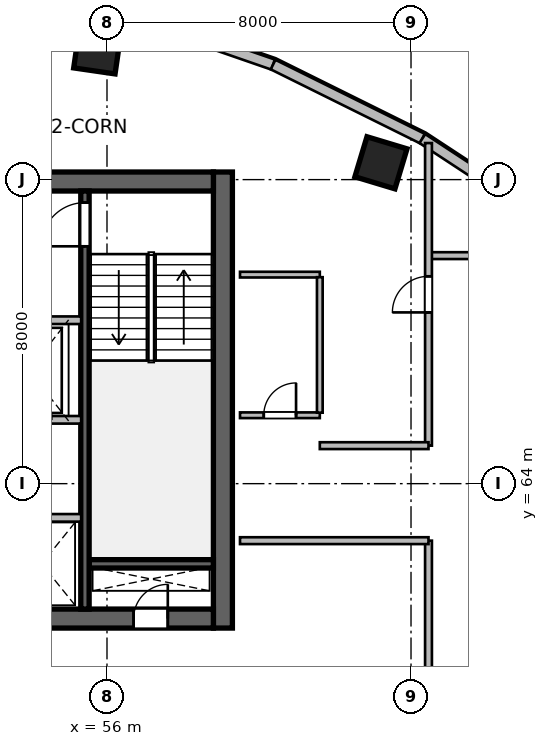
"""IFC4 building model, lengths in metres.
Left out: names, types, materials, properties, quantities, classifications, styles, units other than length and angle.
Written with IfcOpenShell. Run it as: python <this file> out.ifc"""

import sys

from ifc_helpers import new_model, si_unit, direction, frame, frame_2d, origin, origin_2d, place, context, subcontext, project, spatial, rectangle, extrude, source, transform, mapped, element, fill, save


model = new_model("IFC4")
c1 = context("Model", 3, precision=1e-05, world=origin(), true_north=direction((0.0, 1.0)))
c2 = subcontext(c1, "Body", "Model", "MODEL_VIEW")
j1 = project(units=[si_unit("LENGTHUNIT", "METRE"), si_unit("PLANEANGLEUNIT", "RADIAN")], contexts=[c1])
p1 = place(None, origin())
s1 = spatial("IfcSite", under=j1, at=p1, CompositionType="ELEMENT")
p2 = place(p1, origin())
s2 = spatial("IfcBuilding", under=s1, at=p2, CompositionType="ELEMENT")
p3 = place(p2, frame((0.0, 0.0, 174.0)))
s3 = spatial("IfcBuildingStorey", under=s2, at=p3, CompositionType="ELEMENT", Elevation=174.0)
m1 = source(origin(), c2, "Body", "SweptSolid", [
    extrude(rectangle(XDim=12.0, YDim=0.5, at=frame_2d((6.0, 0.0))), origin(), (0.0, 0.0, 1.0), 3.9),
])
p4 = place(p3, frame((59.05, 60.2, 0.0), z_axis=(0.0, 0.0, 1.0), x_axis=(0.0, 1.0, 0.0)))
e1 = element("IfcWall", 1, at=p4, inside=s3, PredefinedType="SHEAR", context=c2, shape_type="MappedRepresentation", body=[
    mapped(m1, transform((0.0, 0.0, 0.0), scale=1.0)),
])
m2 = source(origin(), c2, "Body", "SweptSolid", [
    extrude(rectangle(XDim=21.6, YDim=0.5, at=frame_2d((10.8, 0.0))), origin(), (0.0, 0.0, 1.0), 3.9),
])
p5 = place(p3, frame((37.2, 60.45, 0.0), z_axis=(0.0, 0.0, 1.0), x_axis=(1.0, 0.0, 0.0)))
e2 = element("IfcWall", 2, at=p5, inside=s3, PredefinedType="SHEAR", context=c2, shape_type="MappedRepresentation", body=[
    mapped(m2, transform((0.0, 0.0, 0.0), scale=1.0)),
])
p6 = place(p5, frame((1.1, 0.0, 0.0)))
e3 = element("IfcOpeningElement", 3, at=p6, cuts=e2, PredefinedType="OPENING", context=c2, shape_type="SweptSolid", body=[
    extrude(rectangle(XDim=1.15, YDim=2.15, at=frame_2d((0.575, 1.075))), frame((0.0, 0.26, 0.0), z_axis=(0.0, -1.0, 0.0), x_axis=(1.0, 0.0, 0.0)), (0.0, 0.0, 1.0), 0.52),
])
p7 = place(p5, frame((19.5, 0.0, 0.0)))
e4 = element("IfcOpeningElement", 4, at=p7, cuts=e2, PredefinedType="OPENING", context=c2, shape_type="SweptSolid", body=[
    extrude(rectangle(XDim=0.9, YDim=2.1, at=frame_2d((0.45, 1.05))), frame((0.0, 0.26, 0.0), z_axis=(0.0, -1.0, 0.0), x_axis=(1.0, 0.0, 0.0)), (0.0, 0.0, 1.0), 0.52),
])
p8 = place(p5, frame((12.02, 0.0, 0.0)))
e5 = element("IfcOpeningElement", 5, at=p8, cuts=e2, PredefinedType="OPENING", context=c2, shape_type="SweptSolid", body=[
    extrude(rectangle(XDim=1.6, YDim=2.15, at=frame_2d((0.8, 1.075))), frame((0.0, 0.26, 0.0), z_axis=(0.0, -1.0, 0.0), x_axis=(1.0, 0.0, 0.0)), (0.0, 0.0, 1.0), 0.52),
])
p9 = place(p3, frame((37.2, 71.95, 0.0), z_axis=(0.0, 0.0, 1.0), x_axis=(1.0, 0.0, 0.0)))
e6 = element("IfcWall", 6, at=p9, inside=s3, PredefinedType="SHEAR", context=c2, shape_type="MappedRepresentation", body=[
    mapped(m2, transform((0.0, 0.0, 0.0), scale=1.0)),
])
p10 = place(p9, frame((1.2, 0.0, 0.0)))
e7 = element("IfcOpeningElement", 7, at=p10, cuts=e6, PredefinedType="OPENING", context=c2, shape_type="SweptSolid", body=[
    extrude(rectangle(XDim=0.9, YDim=2.1, at=frame_2d((0.45, 1.05))), frame((0.0, 0.26, 0.0), z_axis=(0.0, -1.0, 0.0), x_axis=(1.0, 0.0, 0.0)), (0.0, 0.0, 1.0), 0.52),
])
p11 = place(p9, frame((14.7, 0.0, 0.0)))
e8 = element("IfcOpeningElement", 8, at=p11, cuts=e6, PredefinedType="OPENING", context=c2, shape_type="SweptSolid", body=[
    extrude(rectangle(XDim=1.2, YDim=2.15, at=frame_2d((0.6, 1.075))), frame((0.0, 0.26, 0.0), z_axis=(0.0, -1.0, 0.0), x_axis=(1.0, 0.0, 0.0)), (0.0, 0.0, 1.0), 0.52),
])
p12 = place(p9, frame((4.15, 0.0, 0.0)))
e9 = element("IfcOpeningElement", 9, at=p12, cuts=e6, PredefinedType="OPENING", context=c2, shape_type="SweptSolid", body=[
    extrude(rectangle(XDim=1.3, YDim=2.15, at=frame_2d((0.65, 1.075))), frame((0.0, 0.26, 0.0), z_axis=(0.0, -1.0, 0.0), x_axis=(1.0, 0.0, 0.0)), (0.0, 0.0, 1.0), 0.52),
])
p13 = place(p9, frame((6.76, 0.0, 0.0)))
e10 = element("IfcOpeningElement", 10, at=p13, cuts=e6, PredefinedType="OPENING", context=c2, shape_type="SweptSolid", body=[
    extrude(rectangle(XDim=0.85, YDim=2.1, at=frame_2d((0.425, 1.05))), frame((0.0, 0.26, 0.0), z_axis=(0.0, -1.0, 0.0), x_axis=(1.0, 0.0, 0.0)), (0.0, 0.0, 1.0), 0.52),
])
p14 = place(p9, frame((8.76, 0.0, 0.0)))
e11 = element("IfcOpeningElement", 11, at=p14, cuts=e6, PredefinedType="OPENING", context=c2, shape_type="SweptSolid", body=[
    extrude(rectangle(XDim=0.85, YDim=2.1, at=frame_2d((0.425, 1.05))), frame((0.0, 0.26, 0.0), z_axis=(0.0, -1.0, 0.0), x_axis=(1.0, 0.0, 0.0)), (0.0, 0.0, 1.0), 0.52),
])
p15 = place(p9, frame((10.725, 0.0, 0.0)))
e12 = element("IfcOpeningElement", 12, at=p15, cuts=e6, PredefinedType="OPENING", context=c2, shape_type="SweptSolid", body=[
    extrude(rectangle(XDim=0.85, YDim=2.1, at=frame_2d((0.425, 1.05))), frame((0.0, 0.26, 0.0), z_axis=(0.0, -1.0, 0.0), x_axis=(1.0, 0.0, 0.0)), (0.0, 0.0, 1.0), 0.52),
])
m3 = source(origin(), c2, "Body", "SweptSolid", [
    extrude(rectangle(XDim=3.27, YDim=0.22, at=frame_2d((1.635, 0.0))), origin(), (0.0, 0.0, 1.0), 3.9),
])
p16 = place(p3, frame((55.53, 61.89, 0.0), z_axis=(0.0, 0.0, 1.0), x_axis=(1.0, 0.0, 0.0)))
e13 = element("IfcWall", 13, at=p16, inside=s3, PredefinedType="SHEAR", context=c2, shape_type="MappedRepresentation", body=[
    mapped(m3, transform((0.0, 0.0, 0.0), scale=1.0)),
])
m4 = source(origin(), c2, "Body", "SweptSolid", [
    extrude(rectangle(XDim=11.0, YDim=0.22, at=frame_2d((5.5, 0.0))), origin(), (0.0, 0.0, 1.0), 3.9),
])
p17 = place(p3, frame((55.42, 60.7, 0.0), z_axis=(0.0, 0.0, 1.0), x_axis=(0.0, 1.0, 0.0)))
e14 = element("IfcWall", 14, at=p17, inside=s3, PredefinedType="SHEAR", context=c2, shape_type="MappedRepresentation", body=[
    mapped(m4, transform((0.0, 0.0, 0.0), scale=1.0)),
])
p18 = place(p17, frame((9.545, 0.0, 0.0)))
e15 = element("IfcOpeningElement", 15, at=p18, cuts=e14, PredefinedType="OPENING", context=c2, shape_type="SweptSolid", body=[
    extrude(rectangle(XDim=1.15, YDim=2.15, at=frame_2d((0.575, 1.075))), frame((0.0, 0.12, 0.0), z_axis=(0.0, -1.0, 0.0), x_axis=(1.0, 0.0, 0.0)), (0.0, 0.0, 1.0), 0.24),
])
m5 = source(origin(), c2, "Body", "SweptSolid", [
    extrude(rectangle(XDim=1.1, YDim=1.1, at=origin_2d()), origin(), (0.0, 0.0, 1.0), 3.9),
])
for number, where, z_axis, x_axis in (
    (16, (55.747, 75.404, 0.0), (0.0, 0.0, 1.0), (0.143, 0.99, 0.0)),
    (17, (63.209, 72.442, 0.0), (0.0, 0.0, 1.0), (0.289, 0.957, 0.0)),
):
    element("IfcColumn", number, at=place(p3, frame(where, z_axis=z_axis, x_axis=x_axis)), inside=s3, PredefinedType="COLUMN", context=c2, shape_type="MappedRepresentation", body=[
        mapped(m5, transform((0.0, 0.0, 0.0), scale=1.0)),
    ])
m6 = source(origin(), c2, "Body", "SweptSolid", [
    extrude(rectangle(XDim=4.29, YDim=0.28, at=frame_2d((2.145, 0.0))), origin(), (0.0, 0.0, 1.0), 3.65),
])
p19 = place(p3, frame((56.317, 76.431, 0.0), z_axis=(0.0, 0.0, 1.0), x_axis=(0.944883859218, -0.3274057003, 0.0)))
e18 = element("IfcWall", 18, at=p19, inside=s3, PredefinedType="SOLIDWALL", context=c2, shape_type="MappedRepresentation", body=[
    mapped(m6, transform((0.0, 0.0, 0.0), scale=1.0)),
])
m7 = source(origin(), c2, "Body", "SweptSolid", [
    extrude(rectangle(XDim=4.384, YDim=0.28, at=frame_2d((2.192, 0.0))), origin(), (0.0, 0.0, 1.0), 3.65),
])
p20 = place(p3, frame((60.37, 75.027, 0.0), z_axis=(0.0, 0.0, 1.0), x_axis=(0.895969968053, -0.444114643248, 0.0)))
e19 = element("IfcWall", 19, at=p20, inside=s3, PredefinedType="SOLIDWALL", context=c2, shape_type="MappedRepresentation", body=[
    mapped(m7, transform((0.0, 0.0, 0.0), scale=1.0)),
])
m8 = source(origin(), c2, "Body", "SweptSolid", [
    extrude(rectangle(XDim=4.501, YDim=0.28, at=frame_2d((2.25, 0.0))), origin(), (0.0, 0.0, 1.0), 3.65),
])
p21 = place(p3, frame((64.298, 73.08, 0.0), z_axis=(0.0, 0.0, 1.0), x_axis=(0.835984920737, -0.548752414391, 0.0)))
e20 = element("IfcWall", 20, at=p21, inside=s3, PredefinedType="SOLIDWALL", context=c2, shape_type="MappedRepresentation", body=[
    mapped(m8, transform((0.0, 0.0, 0.0), scale=1.0)),
])
m9 = source(origin(), c2, "Body", "SweptSolid", [
    extrude(rectangle(XDim=5.62, YDim=0.2, at=frame_2d((2.81, 0.0))), origin(), (0.0, 0.0, 1.0), 3.65),
])
p22 = place(p3, frame((49.7, 68.3, 0.0), z_axis=(0.0, 0.0, 1.0), x_axis=(1.0, 0.0, 0.0)))
e21 = element("IfcWall", 21, at=p22, inside=s3, PredefinedType="SOLIDWALL", context=c2, shape_type="MappedRepresentation", body=[
    mapped(m9, transform((0.0, 0.0, 0.0), scale=1.0)),
])
p23 = place(p22, frame((1.6, 0.0, 0.0)))
e22 = element("IfcOpeningElement", 22, at=p23, cuts=e21, PredefinedType="OPENING", context=c2, shape_type="SweptSolid", body=[
    extrude(rectangle(XDim=1.1, YDim=2.15, at=frame_2d((0.55, 1.075))), frame((0.0, 0.11, 0.0), z_axis=(0.0, -1.0, 0.0), x_axis=(1.0, 0.0, 0.0)), (0.0, 0.0, 1.0), 0.22),
])
p24 = place(p22, frame((3.7, 0.0, 0.0)))
e23 = element("IfcOpeningElement", 23, at=p24, cuts=e21, PredefinedType="OPENING", context=c2, shape_type="SweptSolid", body=[
    extrude(rectangle(XDim=1.1, YDim=2.15, at=frame_2d((0.55, 1.075))), frame((0.0, 0.11, 0.0), z_axis=(0.0, -1.0, 0.0), x_axis=(1.0, 0.0, 0.0)), (0.0, 0.0, 1.0), 0.22),
])
p25 = place(p3, frame((49.7, 65.68, 0.0), z_axis=(0.0, 0.0, 1.0), x_axis=(1.0, 0.0, 0.0)))
e24 = element("IfcWall", 24, at=p25, inside=s3, PredefinedType="SOLIDWALL", context=c2, shape_type="MappedRepresentation", body=[
    mapped(m9, transform((0.0, 0.0, 0.0), scale=1.0)),
])
m10 = source(origin(), c2, "Body", "SweptSolid", [
    extrude(rectangle(XDim=4.1, YDim=0.2, at=frame_2d((2.05, 0.0))), origin(), (0.0, 0.0, 1.0), 3.65),
])
p26 = place(p3, frame((51.22, 63.1, 0.0), z_axis=(0.0, 0.0, 1.0), x_axis=(1.0, 0.0, 0.0)))
e25 = element("IfcWall", 25, at=p26, inside=s3, PredefinedType="SOLIDWALL", context=c2, shape_type="MappedRepresentation", body=[
    mapped(m10, transform((0.0, 0.0, 0.0), scale=1.0)),
])
m11 = source(origin(), c2, "Body", "SweptSolid", [
    extrude(rectangle(XDim=2.1, YDim=0.15, at=frame_2d((1.05, 0.0))), origin(), (0.0, 0.0, 1.0), 3.65),
])
p27 = place(p3, frame((59.5, 65.8, 0.0), z_axis=(0.0, 0.0, 1.0), x_axis=(1.0, 0.0, 0.0)))
e26 = element("IfcWall", 26, at=p27, inside=s3, PredefinedType="PARTITIONING", context=c2, shape_type="MappedRepresentation", body=[
    mapped(m11, transform((0.0, 0.0, 0.0), scale=1.0)),
])
p28 = place(p27, frame((0.625, 0.0, 0.0)))
e27 = element("IfcOpeningElement", 27, at=p28, cuts=e26, PredefinedType="OPENING", context=c2, shape_type="SweptSolid", body=[
    extrude(rectangle(XDim=0.85, YDim=2.1, at=frame_2d((0.425, 1.05))), frame((0.0, 0.085, 0.0), z_axis=(0.0, -1.0, 0.0), x_axis=(1.0, 0.0, 0.0)), (0.0, 0.0, 1.0), 0.17),
])
p29 = place(p3, frame((59.5, 69.5, 0.0), z_axis=(0.0, 0.0, 1.0), x_axis=(1.0, 0.0, 0.0)))
e28 = element("IfcWall", 28, at=p29, inside=s3, PredefinedType="PARTITIONING", context=c2, shape_type="MappedRepresentation", body=[
    mapped(m11, transform((0.0, 0.0, 0.0), scale=1.0)),
])
m12 = source(origin(), c2, "Body", "SweptSolid", [
    extrude(rectangle(XDim=3.565, YDim=0.15, at=frame_2d((1.783, 0.0))), origin(), (0.0, 0.0, 1.0), 3.65),
])
p30 = place(p3, frame((61.6, 65.867, 0.0), z_axis=(0.0, 0.0, 1.0), x_axis=(0.0, 1.0, 0.0)))
e29 = element("IfcWall", 29, at=p30, inside=s3, PredefinedType="PARTITIONING", context=c2, shape_type="MappedRepresentation", body=[
    mapped(m12, transform((0.0, 0.0, 0.0), scale=1.0)),
])
m13 = source(origin(), c2, "Body", "SweptSolid", [
    extrude(rectangle(XDim=2.5, YDim=0.18, at=frame_2d((1.25, 0.0))), origin(), (0.0, 0.0, 1.0), 3.022),
])
p31 = place(p3, frame((64.5, 70.0, 0.0), z_axis=(0.0, 0.0, 1.0), x_axis=(1.0, 0.0, 0.0)))
e30 = element("IfcWall", 30, at=p31, inside=s3, PredefinedType="PLUMBINGWALL", context=c2, shape_type="MappedRepresentation", body=[
    mapped(m13, transform((0.0, 0.0, 0.0), scale=1.0)),
])
m14 = source(origin(), c2, "Body", "SweptSolid", [
    extrude(rectangle(XDim=16.106, YDim=0.18, at=frame_2d((8.053, 0.0))), origin(), (0.0, 0.0, 1.0), 2.942),
])
p32 = place(p3, frame((64.46, 46.394, 0.0), z_axis=(0.0, 0.0, 1.0), x_axis=(0.0, 1.0, 0.0)))
e31 = element("IfcWall", 31, at=p32, inside=s3, PredefinedType="PLUMBINGWALL", context=c2, shape_type="MappedRepresentation", body=[
    mapped(m14, transform((0.0, 0.0, 0.0), scale=1.0)),
])
p33 = place(p32, frame((7.578, 0.0, 0.0)))
e32 = element("IfcOpeningElement", 32, at=p33, cuts=e31, PredefinedType="OPENING", context=c2, shape_type="SweptSolid", body=[
    extrude(rectangle(XDim=0.95, YDim=2.1, at=frame_2d((0.475, 1.05))), frame((0.0, 0.1, 0.0), z_axis=(0.0, -1.0, 0.0), x_axis=(1.0, 0.0, 0.0)), (0.0, 0.0, 1.0), 0.2),
])
m15 = source(origin(), c2, "Body", "SweptSolid", [
    extrude(rectangle(XDim=4.96, YDim=0.18, at=frame_2d((2.48, 0.0))), origin(), (0.0, 0.0, 1.0), 3.65),
])
p34 = place(p3, frame((59.5, 62.5, 0.0), z_axis=(0.0, 0.0, 1.0), x_axis=(1.0, 0.0, 0.0)))
e33 = element("IfcWall", 33, at=p34, inside=s3, PredefinedType="PLUMBINGWALL", context=c2, shape_type="MappedRepresentation", body=[
    mapped(m15, transform((0.0, 0.0, 0.0), scale=1.0)),
])
m16 = source(origin(), c2, "Body", "SweptSolid", [
    extrude(rectangle(XDim=7.962, YDim=0.18, at=frame_2d((3.981, 0.0))), origin(), (0.0, 0.0, 1.0), 3.65),
])
p35 = place(p3, frame((64.46, 65.0, 0.0), z_axis=(0.0, 0.0, 1.0), x_axis=(0.0, 1.0, 0.0)))
e34 = element("IfcWall", 34, at=p35, inside=s3, PredefinedType="PLUMBINGWALL", context=c2, shape_type="MappedRepresentation", body=[
    mapped(m16, transform((0.0, 0.0, 0.0), scale=1.0)),
])
p36 = place(p35, frame((3.506, 0.0, 0.0)))
e35 = element("IfcOpeningElement", 35, at=p36, cuts=e34, PredefinedType="OPENING", context=c2, shape_type="SweptSolid", body=[
    extrude(rectangle(XDim=0.95, YDim=2.1, at=frame_2d((0.475, 1.05))), frame((0.0, 0.1, 0.0), z_axis=(0.0, -1.0, 0.0), x_axis=(1.0, 0.0, 0.0)), (0.0, 0.0, 1.0), 0.2),
])
m17 = source(origin(), c2, "Body", "SweptSolid", [
    extrude(rectangle(XDim=2.86, YDim=0.18, at=frame_2d((1.43, 0.0))), origin(), (0.0, 0.0, 1.0), 3.65),
])
p37 = place(p3, frame((61.6, 65.0, 0.0), z_axis=(0.0, 0.0, 1.0), x_axis=(1.0, 0.0, 0.0)))
e36 = element("IfcWall", 36, at=p37, inside=s3, PredefinedType="PLUMBINGWALL", context=c2, shape_type="MappedRepresentation", body=[
    mapped(m17, transform((0.0, 0.0, 0.0), scale=1.0)),
])
m18 = source(origin(), c2, "Body", "SweptSolid", [
    extrude(rectangle(XDim=0.9, YDim=2.1, at=frame_2d((0.45, 1.05))), frame((0.0, 0.025, 0.0), z_axis=(0.0, -1.0, 0.0), x_axis=(1.0, 0.0, 0.0)), (0.0, 0.0, 1.0), 0.05),
])
p38 = place(p7, origin())
e37 = element("IfcDoor", 37, at=p38, inside=s3, OperationType="SINGLE_SWING_RIGHT", PredefinedType="DOOR", context=c2, shape_type="MappedRepresentation", body=[
    mapped(m18, transform((0.0, 0.0, 0.0), scale=1.0)),
])
fill(e4, e37)
m19 = source(origin(), c2, "Body", "SweptSolid", [
    extrude(rectangle(XDim=1.15, YDim=2.15, at=frame_2d((0.575, 1.075))), frame((0.0, 0.025, 0.0), z_axis=(0.0, -1.0, 0.0), x_axis=(1.0, 0.0, 0.0)), (0.0, 0.0, 1.0), 0.05),
])
p39 = place(p18, origin())
e38 = element("IfcDoor", 38, at=p39, inside=s3, OperationType="SINGLE_SWING_LEFT", PredefinedType="DOOR", context=c2, shape_type="MappedRepresentation", body=[
    mapped(m19, transform((0.0, 0.0, 0.0), scale=1.0)),
])
fill(e15, e38)
m20 = source(origin(), c2, "Body", "SweptSolid", [
    extrude(rectangle(XDim=0.85, YDim=2.1, at=frame_2d((0.425, 1.05))), frame((0.0, 0.025, 0.0), z_axis=(0.0, -1.0, 0.0), x_axis=(1.0, 0.0, 0.0)), (0.0, 0.0, 1.0), 0.05),
])
p40 = place(p28, origin())
e39 = element("IfcDoor", 39, at=p40, inside=s3, OperationType="SINGLE_SWING_RIGHT", PredefinedType="DOOR", context=c2, shape_type="MappedRepresentation", body=[
    mapped(m20, transform((0.0, 0.0, 0.0), scale=1.0)),
])
fill(e27, e39)
m21 = source(origin(), c2, "Body", "SweptSolid", [
    extrude(rectangle(XDim=0.95, YDim=2.1, at=frame_2d((0.475, 1.05))), frame((0.0, 0.025, 0.0), z_axis=(0.0, -1.0, 0.0), x_axis=(1.0, 0.0, 0.0)), (0.0, 0.0, 1.0), 0.05),
])
p41 = place(p36, origin())
e40 = element("IfcDoor", 40, at=p41, inside=s3, OperationType="SINGLE_SWING_LEFT", PredefinedType="DOOR", context=c2, shape_type="MappedRepresentation", body=[
    mapped(m21, transform((0.0, 0.0, 0.0), scale=1.0)),
])
fill(e35, e40)
save(model, sys.argv[1])
